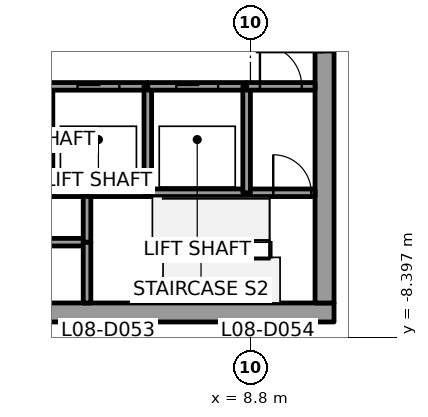
"""IFC4 building model, lengths in metres.
Left out: names, types, materials, properties, quantities, classifications, styles, units other than length and angle.
Written with IfcOpenShell. Run it as: python <this file> out.ifc"""

import sys

from ifc_helpers import new_model, si_unit, direction, frame, frame_2d, origin, place, context, subcontext, project, spatial, rectangle, extrude, element, fill, save


model = new_model("IFC4")
c1 = context("Model", 3, precision=1e-05, world=origin(), true_north=direction((0.0, 1.0)))
c2 = subcontext(c1, "Body", "Model", "MODEL_VIEW")
j1 = project(units=[si_unit("LENGTHUNIT", "METRE"), si_unit("PLANEANGLEUNIT", "RADIAN")], contexts=[c1])
p1 = place(None, origin())
s1 = spatial("IfcSite", under=j1, at=p1, CompositionType="ELEMENT")
p2 = place(p1, origin())
s2 = spatial("IfcBuilding", under=s1, at=p2, CompositionType="ELEMENT")
p3 = place(p2, frame((0.0, 0.0, 51.7)))
s3 = spatial("IfcBuildingStorey", under=s2, at=p3, CompositionType="ELEMENT", Elevation=51.7)
p4 = place(p3, frame((-11.0, -7.75, 0.0), z_axis=(0.0, 0.0, 1.0), x_axis=(1.0, 0.0, 0.0)))
e1 = element("IfcWall", 1, at=p4, inside=s3, PredefinedType="SHEAR", context=c2, shape_type="SweptSolid", body=[
    extrude(rectangle(XDim=22.0, YDim=0.5, at=frame_2d((11.0, 0.0))), origin(), (0.0, 0.0, 1.0), 3.7),
])
p5 = place(p4, frame((10.45, 0.0, 0.0)))
e2 = element("IfcOpeningElement", 2, at=p5, cuts=e1, PredefinedType="OPENING", context=c2, shape_type="SweptSolid", body=[
    extrude(rectangle(XDim=1.1, YDim=2.1, at=frame_2d((0.55, 1.05))), frame((0.0, 0.25, 0.0), z_axis=(0.0, -1.0, 0.0), x_axis=(1.0, 0.0, 0.0)), (0.0, 0.0, 1.0), 0.5),
])
p6 = place(p3, frame((10.75, -7.5, 0.0), z_axis=(0.0, 0.0, 1.0), x_axis=(0.0, 1.0, 0.0)))
e3 = element("IfcWall", 3, at=p6, inside=s3, PredefinedType="SHEAR", context=c2, shape_type="SweptSolid", body=[
    extrude(rectangle(XDim=15.0, YDim=0.5, at=frame_2d((7.5, 0.0))), origin(), (0.0, 0.0, 1.0), 3.7),
])
p7 = place(p6, frame((6.6, 0.0, 0.0)))
e4 = element("IfcOpeningElement", 4, at=p7, cuts=e3, PredefinedType="OPENING", context=c2, shape_type="SweptSolid", body=[
    extrude(rectangle(XDim=1.8, YDim=2.1, at=frame_2d((0.9, 1.05))), frame((0.0, 0.25, 0.0), z_axis=(0.0, -1.0, 0.0), x_axis=(1.0, 0.0, 0.0)), (0.0, 0.0, 1.0), 0.5),
])
p8 = place(p3, frame((4.5, -5.9, 0.0), z_axis=(0.0, 0.0, 1.0), x_axis=(-1.0, 0.0, 0.0)))
e5 = element("IfcWall", 5, at=p8, inside=s3, PredefinedType="SOLIDWALL", context=c2, shape_type="SweptSolid", body=[
    extrude(rectangle(XDim=2.5, YDim=0.2, at=frame_2d((1.25, 0.0))), origin(), (0.0, 0.0, 1.0), 3.55),
])
p9 = place(p3, frame((4.5, -4.6, 0.0), z_axis=(0.0, 0.0, 1.0), x_axis=(-1.0, 0.0, 0.0)))
e6 = element("IfcWall", 6, at=p9, inside=s3, PredefinedType="SOLIDWALL", context=c2, shape_type="SweptSolid", body=[
    extrude(rectangle(XDim=1.0, YDim=0.2, at=frame_2d((0.5, 0.0))), origin(), (0.0, 0.0, 1.0), 3.55),
])
p10 = place(p3, frame((3.5, -1.8, 0.0), z_axis=(0.0, 0.0, 1.0), x_axis=(1.0, 0.0, 0.0)))
e7 = element("IfcWall", 7, at=p10, inside=s3, PredefinedType="SOLIDWALL", context=c2, shape_type="SweptSolid", body=[
    extrude(rectangle(XDim=2.6, YDim=0.2, at=frame_2d((1.3, 0.0))), origin(), (0.0, 0.0, 1.0), 3.55),
])
p11 = place(p10, frame((0.75, 0.0, 0.0)))
e8 = element("IfcOpeningElement", 8, at=p11, cuts=e7, PredefinedType="OPENING", context=c2, shape_type="SweptSolid", body=[
    extrude(rectangle(XDim=1.1, YDim=2.1, at=frame_2d((0.55, 1.05))), frame((0.0, 0.1, 0.0), z_axis=(0.0, -1.0, 0.0), x_axis=(1.0, 0.0, 0.0)), (0.0, 0.0, 1.0), 0.2),
])
p12 = place(p3, frame((4.5, -7.5, 0.0), z_axis=(0.0, 0.0, 1.0), x_axis=(0.0, 1.0, 0.0)))
e9 = element("IfcWall", 9, at=p12, inside=s3, PredefinedType="SOLIDWALL", context=c2, shape_type="SweptSolid", body=[
    extrude(rectangle(XDim=1.6, YDim=0.2, at=frame_2d((0.8, 0.0))), origin(), (0.0, 0.0, 1.0), 3.55),
])
p13 = place(p3, frame((4.5, -5.9, 0.0), z_axis=(0.0, 0.0, 1.0), x_axis=(0.0, 1.0, 0.0)))
e10 = element("IfcWall", 10, at=p13, inside=s3, PredefinedType="SOLIDWALL", context=c2, shape_type="SweptSolid", body=[
    extrude(rectangle(XDim=1.3, YDim=0.2, at=frame_2d((0.65, 0.0))), origin(), (0.0, 0.0, 1.0), 3.55),
])
p14 = place(p3, frame((4.5, -4.6, 0.0), z_axis=(0.0, 0.0, 1.0), x_axis=(1.0, 0.0, 0.0)))
e11 = element("IfcWall", 11, at=p14, inside=s3, PredefinedType="SOLIDWALL", context=c2, shape_type="SweptSolid", body=[
    extrude(rectangle(XDim=1.6, YDim=0.2, at=frame_2d((0.8, 0.0))), origin(), (0.0, 0.0, 1.0), 3.55),
])
p15 = place(p3, frame((6.1, -4.6, 0.0), z_axis=(0.0, 0.0, 1.0), x_axis=(1.0, 0.0, 0.0)))
e12 = element("IfcWall", 12, at=p15, inside=s3, PredefinedType="SOLIDWALL", context=c2, shape_type="SweptSolid", body=[
    extrude(rectangle(XDim=2.6, YDim=0.2, at=frame_2d((1.3, 0.0))), origin(), (0.0, 0.0, 1.0), 3.55),
])
p16 = place(p3, frame((6.1, -4.6, 0.0), z_axis=(0.0, 0.0, 1.0), x_axis=(0.0, 1.0, 0.0)))
e13 = element("IfcWall", 13, at=p16, inside=s3, PredefinedType="SOLIDWALL", context=c2, shape_type="SweptSolid", body=[
    extrude(rectangle(XDim=2.8, YDim=0.2, at=frame_2d((1.4, 0.0))), origin(), (0.0, 0.0, 1.0), 3.55),
])
p17 = place(p3, frame((6.1, -1.8, 0.0), z_axis=(0.0, 0.0, 1.0), x_axis=(1.0, 0.0, 0.0)))
e14 = element("IfcWall", 14, at=p17, inside=s3, PredefinedType="SOLIDWALL", context=c2, shape_type="SweptSolid", body=[
    extrude(rectangle(XDim=2.6, YDim=0.2, at=frame_2d((1.3, 0.0))), origin(), (0.0, 0.0, 1.0), 3.55),
])
p18 = place(p17, frame((0.75, 0.0, 0.0)))
e15 = element("IfcOpeningElement", 15, at=p18, cuts=e14, PredefinedType="OPENING", context=c2, shape_type="SweptSolid", body=[
    extrude(rectangle(XDim=1.1, YDim=2.1, at=frame_2d((0.55, 1.05))), frame((0.0, 0.1, 0.0), z_axis=(0.0, -1.0, 0.0), x_axis=(1.0, 0.0, 0.0)), (0.0, 0.0, 1.0), 0.2),
])
p19 = place(p3, frame((8.7, -4.6, 0.0), z_axis=(0.0, 0.0, 1.0), x_axis=(1.0, 0.0, 0.0)))
e16 = element("IfcWall", 16, at=p19, inside=s3, PredefinedType="SOLIDWALL", context=c2, shape_type="SweptSolid", body=[
    extrude(rectangle(XDim=1.8, YDim=0.2, at=frame_2d((0.9, 0.0))), origin(), (0.0, 0.0, 1.0), 3.55),
])
p20 = place(p19, frame((0.7, 0.0, 0.0)))
e17 = element("IfcOpeningElement", 17, at=p20, cuts=e16, PredefinedType="OPENING", context=c2, shape_type="SweptSolid", body=[
    extrude(rectangle(XDim=1.0, YDim=2.1, at=frame_2d((0.5, 1.05))), frame((0.0, 0.1, 0.0), z_axis=(0.0, -1.0, 0.0), x_axis=(1.0, 0.0, 0.0)), (0.0, 0.0, 1.0), 0.2),
])
p21 = place(p3, frame((8.7, -1.8, 0.0), z_axis=(0.0, 0.0, 1.0), x_axis=(0.0, -1.0, 0.0)))
e18 = element("IfcWall", 18, at=p21, inside=s3, PredefinedType="SOLIDWALL", context=c2, shape_type="SweptSolid", body=[
    extrude(rectangle(XDim=2.8, YDim=0.2, at=frame_2d((1.4, 0.0))), origin(), (0.0, 0.0, 1.0), 3.55),
])
p22 = place(p3, frame((8.7, -1.8, 0.0), z_axis=(0.0, 0.0, 1.0), x_axis=(1.0, 0.0, 0.0)))
e19 = element("IfcWall", 19, at=p22, inside=s3, PredefinedType="SOLIDWALL", context=c2, shape_type="SweptSolid", body=[
    extrude(rectangle(XDim=1.8, YDim=0.2, at=frame_2d((0.9, 0.0))), origin(), (0.0, 0.0, 1.0), 3.55),
])
p23 = place(p22, frame((0.35, 0.0, 0.0)))
e20 = element("IfcOpeningElement", 20, at=p23, cuts=e19, PredefinedType="OPENING", context=c2, shape_type="SweptSolid", body=[
    extrude(rectangle(XDim=1.1, YDim=2.1, at=frame_2d((0.55, 1.05))), frame((0.0, 0.1, 0.0), z_axis=(0.0, -1.0, 0.0), x_axis=(1.0, 0.0, 0.0)), (0.0, 0.0, 1.0), 0.2),
])
p24 = place(p11, origin())
e21 = element("IfcDoor", 21, at=p24, inside=s3, OperationType="SLIDING_TO_LEFT", PredefinedType="DOOR", context=c2, shape_type="SweptSolid", body=[
    extrude(rectangle(XDim=1.1, YDim=2.1, at=frame_2d((0.55, 1.05))), frame((0.0, 0.025, 0.0), z_axis=(0.0, -1.0, 0.0), x_axis=(1.0, 0.0, 0.0)), (0.0, 0.0, 1.0), 0.05),
])
fill(e8, e21)
p25 = place(p18, origin())
e22 = element("IfcDoor", 22, at=p25, inside=s3, OperationType="SLIDING_TO_LEFT", PredefinedType="DOOR", context=c2, shape_type="SweptSolid", body=[
    extrude(rectangle(XDim=1.1, YDim=2.1, at=frame_2d((0.55, 1.05))), frame((0.0, 0.025, 0.0), z_axis=(0.0, -1.0, 0.0), x_axis=(1.0, 0.0, 0.0)), (0.0, 0.0, 1.0), 0.05),
])
fill(e15, e22)
p26 = place(p23, origin())
e23 = element("IfcDoor", 23, at=p26, inside=s3, OperationType="SINGLE_SWING_RIGHT", PredefinedType="DOOR", context=c2, shape_type="SweptSolid", body=[
    extrude(rectangle(XDim=1.1, YDim=2.1, at=frame_2d((0.55, 1.05))), frame((0.0, 0.025, 0.0), z_axis=(0.0, -1.0, 0.0), x_axis=(1.0, 0.0, 0.0)), (0.0, 0.0, 1.0), 0.05),
])
fill(e20, e23)
p27 = place(p20, origin())
e24 = element("IfcDoor", 24, at=p27, inside=s3, OperationType="SINGLE_SWING_RIGHT", PredefinedType="DOOR", context=c2, shape_type="SweptSolid", body=[
    extrude(rectangle(XDim=1.0, YDim=2.1, at=frame_2d((0.5, 1.05))), frame((0.0, 0.025, 0.0), z_axis=(0.0, -1.0, 0.0), x_axis=(1.0, 0.0, 0.0)), (0.0, 0.0, 1.0), 0.05),
])
fill(e17, e24)
p28 = place(p7, origin())
e25 = element("IfcDoor", 25, at=p28, inside=s3, OperationType="DOUBLE_DOOR_SINGLE_SWING", PredefinedType="DOOR", context=c2, shape_type="SweptSolid", body=[
    extrude(rectangle(XDim=1.8, YDim=2.1, at=frame_2d((0.9, 1.05))), frame((0.0, 0.025, 0.0), z_axis=(0.0, -1.0, 0.0), x_axis=(1.0, 0.0, 0.0)), (0.0, 0.0, 1.0), 0.05),
])
fill(e4, e25)
save(model, sys.argv[1])
